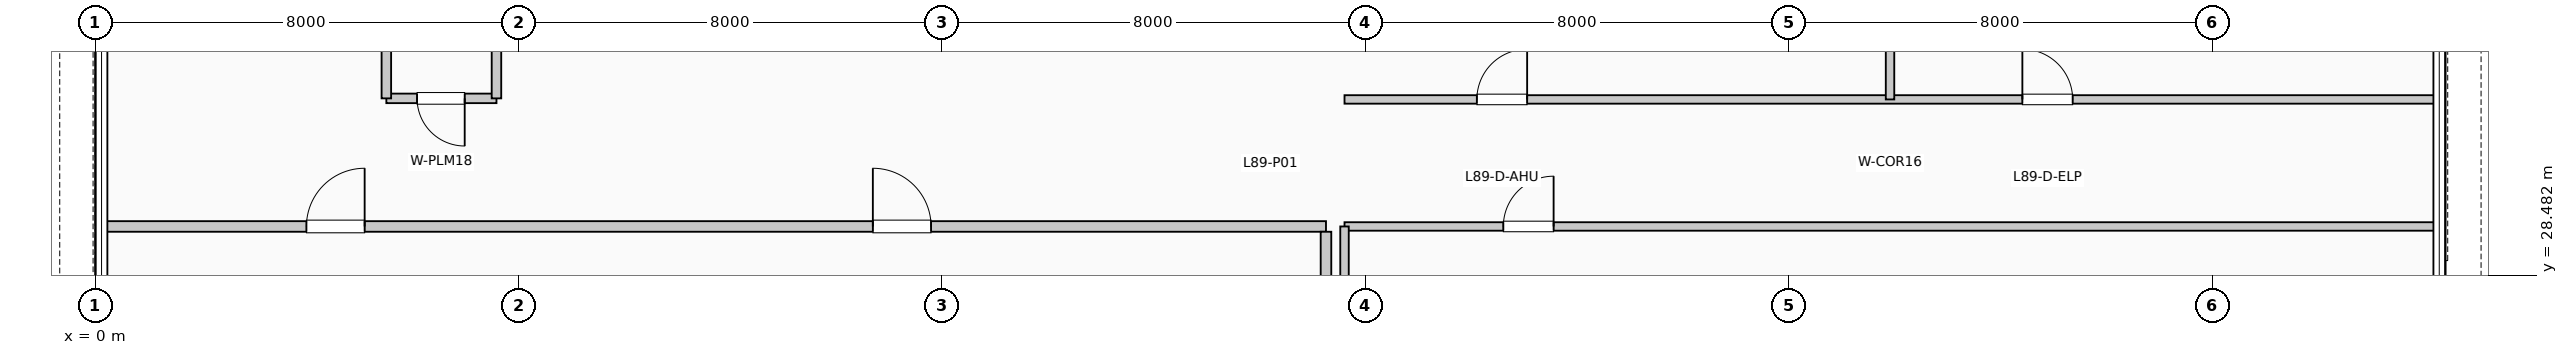
"""IFC4 building model, lengths in metres.
Left out: names, types, materials, properties, quantities, classifications, styles, units other than length and angle.
Written with IfcOpenShell. Run it as: python <this file> out.ifc"""

import sys

from ifc_helpers import new_model, si_unit, direction, frame, frame_2d, origin, place, context, subcontext, project, spatial, rectangle, extrude, element, fill, save


model = new_model("IFC4")
c1 = context("Model", 3, precision=1e-05, world=origin(), true_north=direction((0.0, 1.0)))
c2 = subcontext(c1, "Body", "Model", "MODEL_VIEW")
j1 = project(units=[si_unit("LENGTHUNIT", "METRE"), si_unit("PLANEANGLEUNIT", "RADIAN")], contexts=[c1])
p1 = place(None, origin())
s1 = spatial("IfcSite", under=j1, at=p1, CompositionType="ELEMENT")
p2 = place(p1, origin())
s2 = spatial("IfcBuilding", under=s1, at=p2, CompositionType="ELEMENT")
p3 = place(p2, frame((0.0, 0.0, 365.97)))
s3 = spatial("IfcBuildingStorey", under=s2, at=p3, CompositionType="ELEMENT", Elevation=365.97)
p4 = place(p3, frame((5.5, 31.82, 0.0), z_axis=(0.0, 0.0, 1.0), x_axis=(1.0, 0.0, 0.0)))
e1 = element("IfcWall", 1, at=p4, inside=s3, PredefinedType="PLUMBINGWALL", context=c2, shape_type="SweptSolid", body=[
    extrude(rectangle(XDim=2.08, YDim=0.18, at=frame_2d((1.04, 0.0))), origin(), (0.0, 0.0, 1.0), 3.61),
])
p5 = place(p4, frame((1.48, 0.0, 0.0), z_axis=(0.0, 0.0, 1.0), x_axis=(-1.0, 0.0, 0.0)))
e2 = element("IfcOpeningElement", 2, at=p5, cuts=e1, PredefinedType="OPENING", context=c2, shape_type="SweptSolid", body=[
    extrude(rectangle(XDim=0.9, YDim=2.1, at=frame_2d((0.45, 1.05))), frame((0.0, 0.1, 0.0), z_axis=(0.0, -1.0, 0.0), x_axis=(1.0, 0.0, 0.0)), (0.0, 0.0, 1.0), 0.2),
])
for number, where, z_axis, x_axis in (
    (3, (7.58, 31.82, 0.0), (0.0, 0.0, 1.0), (0.0, 1.0, 0.0)),
    (4, (5.5, 31.82, 0.0), (0.0, 0.0, 1.0), (0.0, 1.0, 0.0)),
):
    element("IfcWall", number, at=place(p3, frame(where, z_axis=z_axis, x_axis=x_axis)), inside=s3, PredefinedType="PLUMBINGWALL", context=c2, shape_type="SweptSolid", body=[
        extrude(rectangle(XDim=2.36, YDim=0.18, at=frame_2d((1.18, 0.0))), origin(), (0.0, 0.0, 1.0), 3.61),
    ])
p6 = place(p3, frame((0.19, 29.4, 0.0), z_axis=(0.0, 0.0, 1.0), x_axis=(1.0, 0.0, 0.0)))
e5 = element("IfcWall", 5, at=p6, inside=s3, PredefinedType="PARTITIONING", context=c2, shape_type="SweptSolid", body=[
    extrude(rectangle(XDim=23.06, YDim=0.2, at=frame_2d((11.53, 0.0))), origin(), (0.0, 0.0, 1.0), 3.295),
])
p7 = place(p6, frame((3.8, 0.0, 0.0)))
e6 = element("IfcOpeningElement", 6, at=p7, cuts=e5, PredefinedType="OPENING", context=c2, shape_type="SweptSolid", body=[
    extrude(rectangle(XDim=1.1, YDim=2.15, at=frame_2d((0.55, 1.075))), frame((0.0, 0.11, 0.0), z_axis=(0.0, -1.0, 0.0), x_axis=(1.0, 0.0, 0.0)), (0.0, 0.0, 1.0), 0.22),
])
p8 = place(p6, frame((14.5, 0.0, 0.0)))
e7 = element("IfcOpeningElement", 7, at=p8, cuts=e5, PredefinedType="OPENING", context=c2, shape_type="SweptSolid", body=[
    extrude(rectangle(XDim=1.1, YDim=2.15, at=frame_2d((0.55, 1.075))), frame((0.0, 0.11, 0.0), z_axis=(0.0, -1.0, 0.0), x_axis=(1.0, 0.0, 0.0)), (0.0, 0.0, 1.0), 0.22),
])
p9 = place(p3, frame((23.25, 11.79, 0.0), z_axis=(0.0, 0.0, 1.0), x_axis=(0.0, 1.0, 0.0)))
e8 = element("IfcWall", 8, at=p9, inside=s3, PredefinedType="PARTITIONING", context=c2, shape_type="SweptSolid", body=[
    extrude(rectangle(XDim=17.51, YDim=0.2, at=frame_2d((8.755, 0.0))), origin(), (0.0, 0.0, 1.0), 3.095),
])
p10 = place(p3, frame((23.6, 31.8, 0.0), z_axis=(0.0, 0.0, 1.0), x_axis=(1.0, 0.0, 0.0)))
e9 = element("IfcWall", 9, at=p10, inside=s3, PredefinedType="PARTITIONING", context=c2, shape_type="SweptSolid", body=[
    extrude(rectangle(XDim=20.61, YDim=0.16, at=frame_2d((10.305, 0.0))), origin(), (0.0, 0.0, 1.0), 3.61),
])
p11 = place(p10, frame((2.5, 0.0, 0.0)))
e10 = element("IfcOpeningElement", 10, at=p11, cuts=e9, PredefinedType="OPENING", context=c2, shape_type="SweptSolid", body=[
    extrude(rectangle(XDim=0.95, YDim=2.1, at=frame_2d((0.475, 1.05))), frame((0.0, 0.09, 0.0), z_axis=(0.0, -1.0, 0.0), x_axis=(1.0, 0.0, 0.0)), (0.0, 0.0, 1.0), 0.18),
])
p12 = place(p10, frame((12.805, 0.0, 0.0)))
e11 = element("IfcOpeningElement", 11, at=p12, cuts=e9, PredefinedType="OPENING", context=c2, shape_type="SweptSolid", body=[
    extrude(rectangle(XDim=0.95, YDim=2.1, at=frame_2d((0.475, 1.05))), frame((0.0, 0.09, 0.0), z_axis=(0.0, -1.0, 0.0), x_axis=(1.0, 0.0, 0.0)), (0.0, 0.0, 1.0), 0.18),
])
p13 = place(p3, frame((33.905, 31.8, 0.0), z_axis=(0.0, 0.0, 1.0), x_axis=(0.0, 1.0, 0.0)))
e12 = element("IfcWall", 12, at=p13, inside=s3, PredefinedType="PARTITIONING", context=c2, shape_type="SweptSolid", body=[
    extrude(rectangle(XDim=14.01, YDim=0.16, at=frame_2d((7.005, 0.0))), origin(), (0.0, 0.0, 1.0), 3.61),
])
p14 = place(p3, frame((23.6, 29.4, 0.0), z_axis=(0.0, 0.0, 1.0), x_axis=(1.0, 0.0, 0.0)))
e13 = element("IfcWall", 13, at=p14, inside=s3, PredefinedType="PARTITIONING", context=c2, shape_type="SweptSolid", body=[
    extrude(rectangle(XDim=20.61, YDim=0.16, at=frame_2d((10.305, 0.0))), origin(), (0.0, 0.0, 1.0), 3.295),
])
p15 = place(p14, frame((3.0, 0.0, 0.0)))
e14 = element("IfcOpeningElement", 14, at=p15, cuts=e13, PredefinedType="OPENING", context=c2, shape_type="SweptSolid", body=[
    extrude(rectangle(XDim=0.95, YDim=2.1, at=frame_2d((0.475, 1.05))), frame((0.0, 0.09, 0.0), z_axis=(0.0, -1.0, 0.0), x_axis=(1.0, 0.0, 0.0)), (0.0, 0.0, 1.0), 0.18),
])
p16 = place(p3, frame((23.6, 25.19, 0.0), z_axis=(0.0, 0.0, 1.0), x_axis=(0.0, 1.0, 0.0)))
e15 = element("IfcWall", 15, at=p16, inside=s3, PredefinedType="PARTITIONING", context=c2, shape_type="SweptSolid", body=[
    extrude(rectangle(XDim=4.21, YDim=0.16, at=frame_2d((2.105, 0.0))), origin(), (0.0, 0.0, 1.0), 3.095),
])
p17 = place(p5, origin())
e16 = element("IfcDoor", 16, at=p17, inside=s3, OperationType="SINGLE_SWING_RIGHT", PredefinedType="DOOR", context=c2, shape_type="SweptSolid", body=[
    extrude(rectangle(XDim=0.9, YDim=2.1, at=frame_2d((0.45, 1.05))), frame((0.0, 0.025, 0.0), z_axis=(0.0, -1.0, 0.0), x_axis=(1.0, 0.0, 0.0)), (0.0, 0.0, 1.0), 0.05),
])
fill(e2, e16)
p18 = place(p7, origin())
e17 = element("IfcDoor", 17, at=p18, inside=s3, OperationType="SINGLE_SWING_RIGHT", PredefinedType="DOOR", context=c2, shape_type="SweptSolid", body=[
    extrude(rectangle(XDim=1.1, YDim=2.15, at=frame_2d((0.55, 1.075))), frame((0.0, 0.025, 0.0), z_axis=(0.0, -1.0, 0.0), x_axis=(1.0, 0.0, 0.0)), (0.0, 0.0, 1.0), 0.05),
])
fill(e6, e17)
p19 = place(p8, origin())
e18 = element("IfcDoor", 18, at=p19, inside=s3, OperationType="SINGLE_SWING_LEFT", PredefinedType="DOOR", context=c2, shape_type="SweptSolid", body=[
    extrude(rectangle(XDim=1.1, YDim=2.15, at=frame_2d((0.55, 1.075))), frame((0.0, 0.025, 0.0), z_axis=(0.0, -1.0, 0.0), x_axis=(1.0, 0.0, 0.0)), (0.0, 0.0, 1.0), 0.05),
])
fill(e7, e18)
p20 = place(p11, origin())
e19 = element("IfcDoor", 19, at=p20, inside=s3, OperationType="SINGLE_SWING_RIGHT", PredefinedType="DOOR", context=c2, shape_type="SweptSolid", body=[
    extrude(rectangle(XDim=0.95, YDim=2.1, at=frame_2d((0.475, 1.05))), frame((0.0, 0.025, 0.0), z_axis=(0.0, -1.0, 0.0), x_axis=(1.0, 0.0, 0.0)), (0.0, 0.0, 1.0), 0.05),
])
fill(e10, e19)
p21 = place(p12, origin())
e20 = element("IfcDoor", 20, at=p21, inside=s3, OperationType="SINGLE_SWING_LEFT", PredefinedType="DOOR", context=c2, shape_type="SweptSolid", body=[
    extrude(rectangle(XDim=0.95, YDim=2.1, at=frame_2d((0.475, 1.05))), frame((0.0, 0.025, 0.0), z_axis=(0.0, -1.0, 0.0), x_axis=(1.0, 0.0, 0.0)), (0.0, 0.0, 1.0), 0.05),
])
fill(e11, e20)
p22 = place(p15, origin())
e21 = element("IfcDoor", 21, at=p22, inside=s3, OperationType="SINGLE_SWING_RIGHT", PredefinedType="DOOR", context=c2, shape_type="SweptSolid", body=[
    extrude(rectangle(XDim=0.95, YDim=2.1, at=frame_2d((0.475, 1.05))), frame((0.0, 0.025, 0.0), z_axis=(0.0, -1.0, 0.0), x_axis=(1.0, 0.0, 0.0)), (0.0, 0.0, 1.0), 0.05),
])
fill(e14, e21)
save(model, sys.argv[1])
